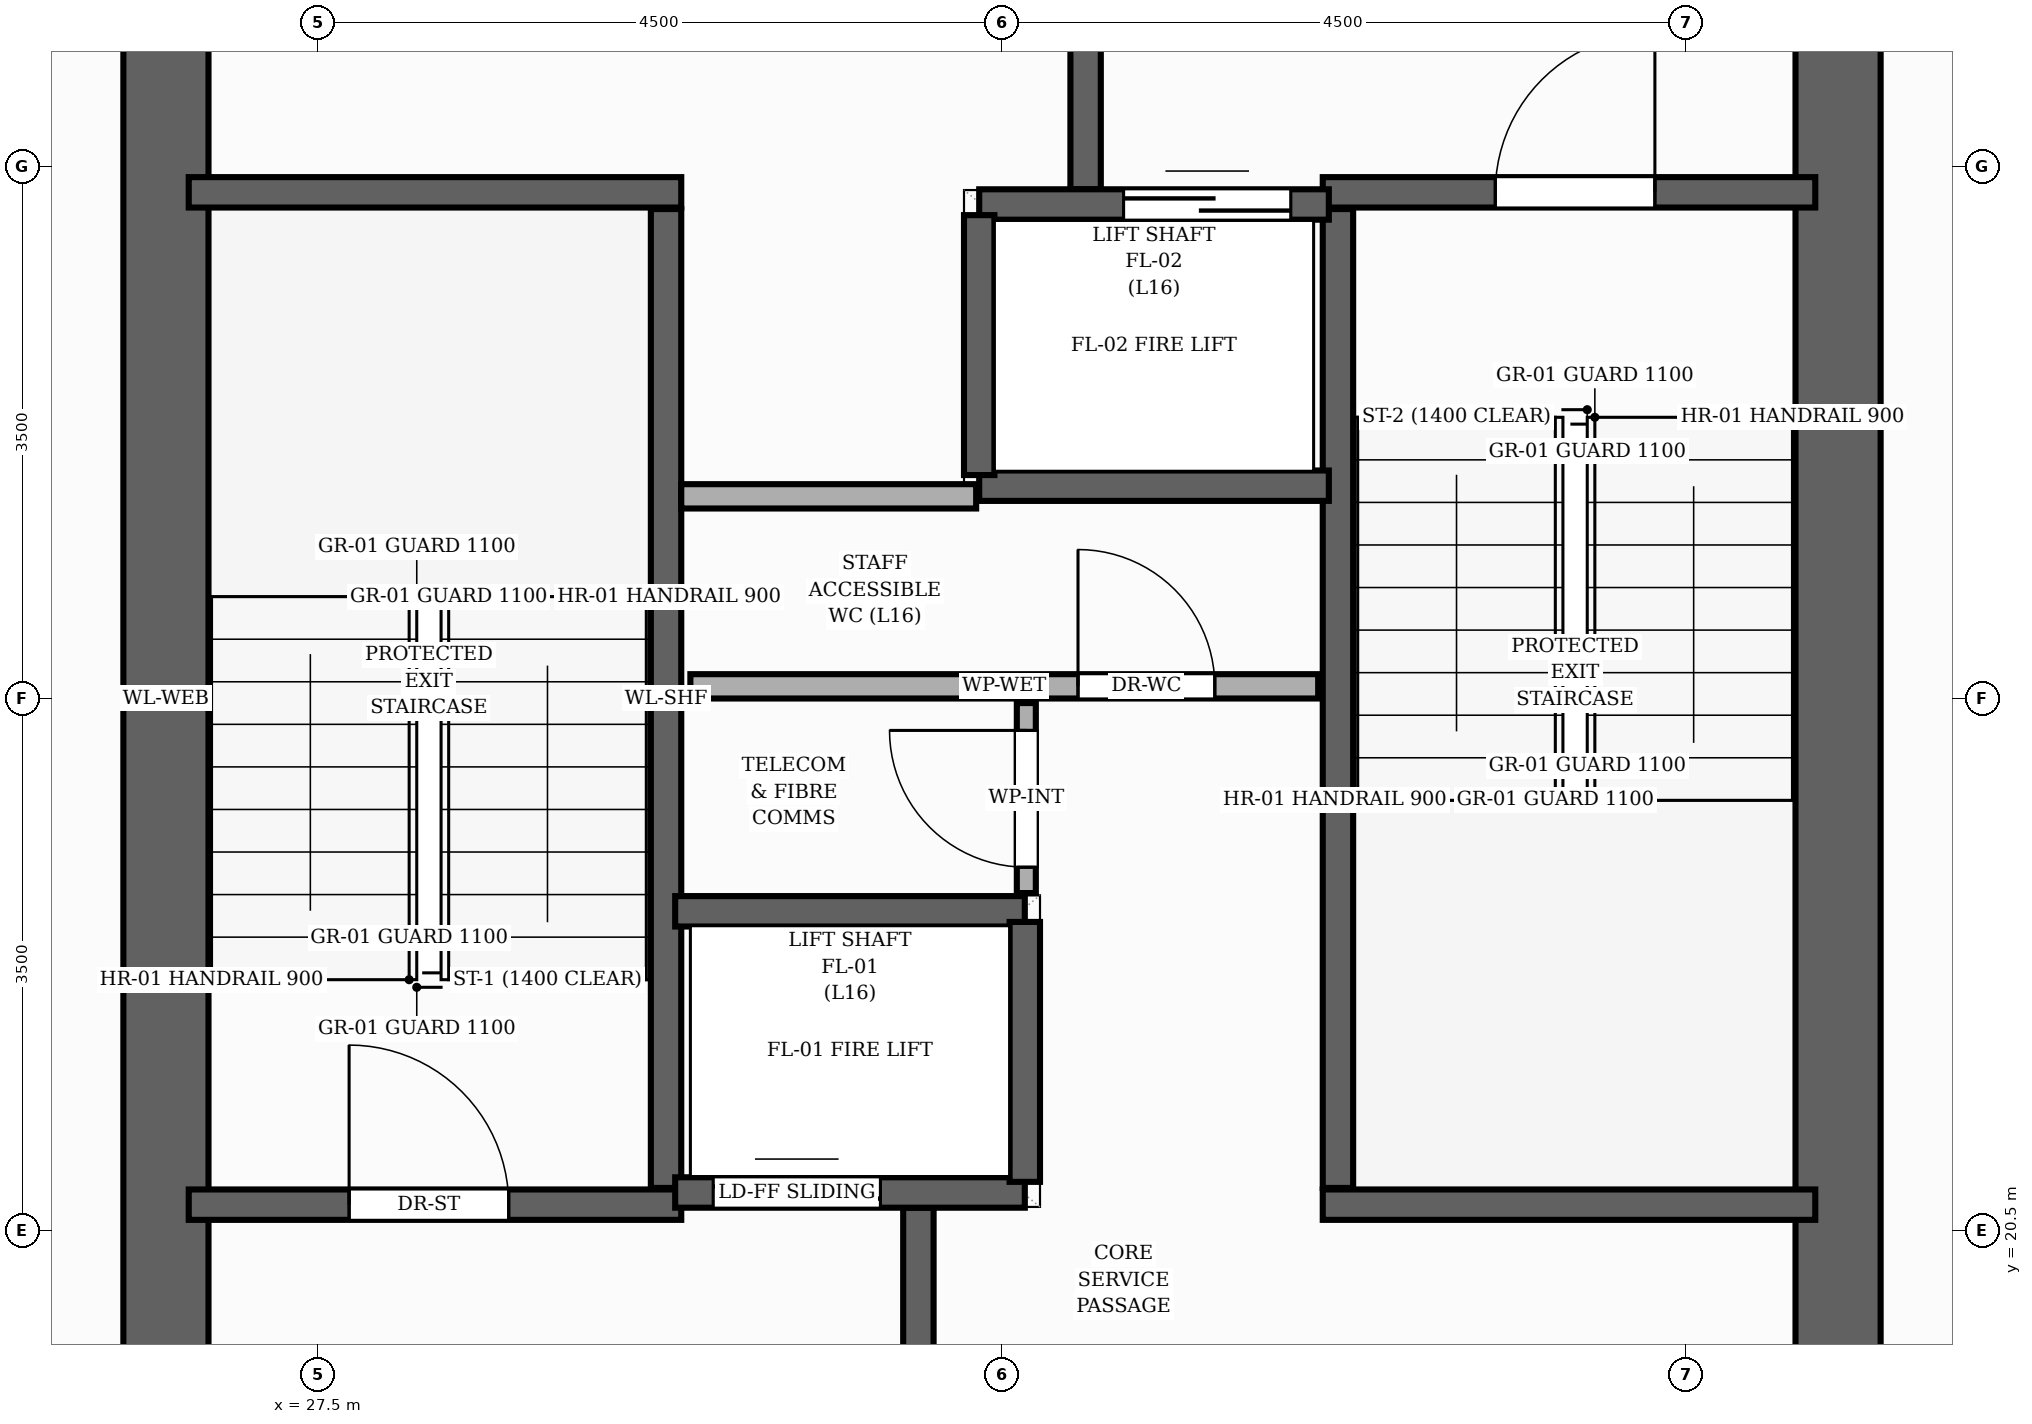
"""IFC4 building model, lengths in metres.
Left out: names, types, materials, properties, quantities, classifications, styles, units other than length and angle.
Written with IfcOpenShell. Run it as: python <this file> out.ifc"""

import sys

from ifc_helpers import new_model, si_unit, direction, frame, frame_2d, origin, place, context, subcontext, project, spatial, rectangle, extrude, element, fill, save


model = new_model("IFC4")
c1 = context("Model", 3, precision=1e-05, world=origin(), true_north=direction((0.0, 1.0)))
c2 = subcontext(c1, "Body", "Model", "MODEL_VIEW")
j1 = project(units=[si_unit("LENGTHUNIT", "METRE"), si_unit("PLANEANGLEUNIT", "RADIAN")], contexts=[c1])
p1 = place(None, origin())
s1 = spatial("IfcSite", under=j1, at=p1, CompositionType="ELEMENT")
p2 = place(p1, origin())
s2 = spatial("IfcBuilding", under=s1, at=p2, CompositionType="ELEMENT")
p3 = place(p2, frame((0.0, 0.0, 56.8)))
s3 = spatial("IfcBuildingStorey", under=s2, at=p3, CompositionType="ELEMENT", Elevation=56.8)
for number, where, z_axis, x_axis in (
    (1, (26.5, 17.4, 0.0), (0.0, 0.0, 1.0), (0.0, 1.0, 0.0)),
    (2, (37.5, 17.4, 0.0), (0.0, 0.0, 1.0), (0.0, 1.0, 0.0)),
):
    element("IfcWall", number, at=place(p3, frame(where, z_axis=z_axis, x_axis=x_axis)), inside=s3, PredefinedType="SHEAR", context=c2, shape_type="SweptSolid", body=[
        extrude(rectangle(XDim=13.2, YDim=0.56, at=frame_2d((6.6, 0.0))), origin(), (0.0, 0.0, 1.0), 3.2),
    ])
p4 = place(p3, frame((29.79, 20.78, 0.0), z_axis=(0.0, 0.0, 1.0), x_axis=(0.0, 1.0, 0.0)))
e3 = element("IfcWall", 3, at=p4, inside=s3, PredefinedType="SHEAR", context=c2, shape_type="SweptSolid", body=[
    extrude(rectangle(XDim=6.44, YDim=0.2, at=frame_2d((3.22, 0.0))), origin(), (0.0, 0.0, 1.0), 3.2),
])
p5 = place(p3, frame((26.65, 27.33, 0.0), z_axis=(0.0, 0.0, 1.0), x_axis=(1.0, 0.0, 0.0)))
e4 = element("IfcWall", 4, at=p5, inside=s3, PredefinedType="SHEAR", context=c2, shape_type="SweptSolid", body=[
    extrude(rectangle(XDim=3.24, YDim=0.2, at=frame_2d((1.62, 0.0))), origin(), (0.0, 0.0, 1.0), 3.2),
])
p6 = place(p3, frame((26.65, 20.67, 0.0), z_axis=(0.0, 0.0, 1.0), x_axis=(1.0, 0.0, 0.0)))
e5 = element("IfcWall", 5, at=p6, inside=s3, PredefinedType="SHEAR", context=c2, shape_type="SweptSolid", body=[
    extrude(rectangle(XDim=3.24, YDim=0.2, at=frame_2d((1.62, 0.0))), origin(), (0.0, 0.0, 1.0), 3.2),
])
p7 = place(p6, frame((1.055, 0.0, 0.0)))
e6 = element("IfcOpeningElement", 6, at=p7, cuts=e5, PredefinedType="OPENING", context=c2, shape_type="SweptSolid", body=[
    extrude(rectangle(XDim=1.05, YDim=2.15, at=frame_2d((0.525, 1.075))), frame((0.0, 0.11, 0.0), z_axis=(0.0, -1.0, 0.0), x_axis=(1.0, 0.0, 0.0)), (0.0, 0.0, 1.0), 0.22),
])
p8 = place(p3, frame((34.21, 20.78, 0.0), z_axis=(0.0, 0.0, 1.0), x_axis=(0.0, 1.0, 0.0)))
e7 = element("IfcWall", 7, at=p8, inside=s3, PredefinedType="SHEAR", context=c2, shape_type="SweptSolid", body=[
    extrude(rectangle(XDim=6.44, YDim=0.2, at=frame_2d((3.22, 0.0))), origin(), (0.0, 0.0, 1.0), 3.2),
])
p9 = place(p3, frame((34.11, 20.67, 0.0), z_axis=(0.0, 0.0, 1.0), x_axis=(1.0, 0.0, 0.0)))
e8 = element("IfcWall", 8, at=p9, inside=s3, PredefinedType="SHEAR", context=c2, shape_type="SweptSolid", body=[
    extrude(rectangle(XDim=3.24, YDim=0.2, at=frame_2d((1.62, 0.0))), origin(), (0.0, 0.0, 1.0), 3.2),
])
p10 = place(p3, frame((34.11, 27.33, 0.0), z_axis=(0.0, 0.0, 1.0), x_axis=(1.0, 0.0, 0.0)))
e9 = element("IfcWall", 9, at=p10, inside=s3, PredefinedType="SHEAR", context=c2, shape_type="SweptSolid", body=[
    extrude(rectangle(XDim=3.24, YDim=0.2, at=frame_2d((1.62, 0.0))), origin(), (0.0, 0.0, 1.0), 3.2),
])
p11 = place(p10, frame((1.135, 0.0, 0.0)))
e10 = element("IfcOpeningElement", 10, at=p11, cuts=e9, PredefinedType="OPENING", context=c2, shape_type="SweptSolid", body=[
    extrude(rectangle(XDim=1.05, YDim=2.15, at=frame_2d((0.525, 1.075))), frame((0.0, 0.11, 0.0), z_axis=(0.0, -1.0, 0.0), x_axis=(1.0, 0.0, 0.0)), (0.0, 0.0, 1.0), 0.22),
])
for number, where, z_axis, x_axis in (
    (11, (31.45, 17.15, 0.0), (0.0, 0.0, 1.0), (0.0, 1.0, 0.0)),
    (12, (32.55, 27.35, 0.0), (0.0, 0.0, 1.0), (0.0, 1.0, 0.0)),
):
    element("IfcWall", number, at=place(p3, frame(where, z_axis=z_axis, x_axis=x_axis)), inside=s3, PredefinedType="SHEAR", context=c2, shape_type="SweptSolid", body=[
        extrude(rectangle(XDim=3.5, YDim=0.2, at=frame_2d((1.75, 0.0))), origin(), (0.0, 0.0, 1.0), 3.2),
    ])
p12 = place(p3, frame((29.85, 20.75, 0.0), z_axis=(0.0, 0.0, 1.0), x_axis=(1.0, 0.0, 0.0)))
e13 = element("IfcWall", 13, at=p12, inside=s3, PredefinedType="SHEAR", context=c2, shape_type="SweptSolid", body=[
    extrude(rectangle(XDim=2.3, YDim=0.2, at=frame_2d((1.15, 0.0))), origin(), (0.0, 0.0, 1.0), 3.2),
])
p13 = place(p12, frame((0.25, 0.0, 0.0)))
e14 = element("IfcOpeningElement", 14, at=p13, cuts=e13, PredefinedType="OPENING", context=c2, shape_type="SweptSolid", body=[
    extrude(rectangle(XDim=1.1, YDim=2.15, at=frame_2d((0.55, 1.075))), frame((0.0, 0.11, 0.0), z_axis=(0.0, -1.0, 0.0), x_axis=(1.0, 0.0, 0.0)), (0.0, 0.0, 1.0), 0.22),
])
p14 = place(p3, frame((29.85, 22.6, 0.0), z_axis=(0.0, 0.0, 1.0), x_axis=(1.0, 0.0, 0.0)))
e15 = element("IfcWall", 15, at=p14, inside=s3, PredefinedType="SHEAR", context=c2, shape_type="SweptSolid", body=[
    extrude(rectangle(XDim=2.3, YDim=0.2, at=frame_2d((1.15, 0.0))), origin(), (0.0, 0.0, 1.0), 3.2),
])
p15 = place(p3, frame((32.15, 20.82, 0.0), z_axis=(0.0, 0.0, 1.0), x_axis=(0.0, 1.0, 0.0)))
e16 = element("IfcWall", 16, at=p15, inside=s3, PredefinedType="SHEAR", context=c2, shape_type="SweptSolid", body=[
    extrude(rectangle(XDim=1.71, YDim=0.2, at=frame_2d((0.855, 0.0))), origin(), (0.0, 0.0, 1.0), 3.2),
])
p16 = place(p3, frame((31.85, 27.25, 0.0), z_axis=(0.0, 0.0, 1.0), x_axis=(1.0, 0.0, 0.0)))
e17 = element("IfcWall", 17, at=p16, inside=s3, PredefinedType="SHEAR", context=c2, shape_type="SweptSolid", body=[
    extrude(rectangle(XDim=2.3, YDim=0.2, at=frame_2d((1.15, 0.0))), origin(), (0.0, 0.0, 1.0), 3.2),
])
p17 = place(p16, frame((0.95, 0.0, 0.0)))
e18 = element("IfcOpeningElement", 18, at=p17, cuts=e17, PredefinedType="OPENING", context=c2, shape_type="SweptSolid", body=[
    extrude(rectangle(XDim=1.1, YDim=2.15, at=frame_2d((0.55, 1.075))), frame((0.0, 0.11, 0.0), z_axis=(0.0, -1.0, 0.0), x_axis=(1.0, 0.0, 0.0)), (0.0, 0.0, 1.0), 0.22),
])
p18 = place(p3, frame((31.85, 25.4, 0.0), z_axis=(0.0, 0.0, 1.0), x_axis=(1.0, 0.0, 0.0)))
e19 = element("IfcWall", 19, at=p18, inside=s3, PredefinedType="SHEAR", context=c2, shape_type="SweptSolid", body=[
    extrude(rectangle(XDim=2.3, YDim=0.2, at=frame_2d((1.15, 0.0))), origin(), (0.0, 0.0, 1.0), 3.2),
])
p19 = place(p3, frame((31.85, 25.47, 0.0), z_axis=(0.0, 0.0, 1.0), x_axis=(0.0, 1.0, 0.0)))
e20 = element("IfcWall", 20, at=p19, inside=s3, PredefinedType="SHEAR", context=c2, shape_type="SweptSolid", body=[
    extrude(rectangle(XDim=1.71, YDim=0.2, at=frame_2d((0.855, 0.0))), origin(), (0.0, 0.0, 1.0), 3.2),
])
p20 = place(p3, frame((29.95, 24.08, 0.0), z_axis=(0.0, 0.0, 1.0), x_axis=(1.0, 0.0, 0.0)))
e21 = element("IfcWall", 21, at=p20, inside=s3, PredefinedType="PLUMBINGWALL", context=c2, shape_type="SweptSolid", body=[
    extrude(rectangle(XDim=4.13, YDim=0.16, at=frame_2d((2.065, 0.0))), origin(), (0.0, 0.0, 1.0), 2.955),
])
p21 = place(p20, frame((2.55, 0.0, 0.0)))
e22 = element("IfcOpeningElement", 22, at=p21, cuts=e21, PredefinedType="OPENING", context=c2, shape_type="SweptSolid", body=[
    extrude(rectangle(XDim=0.9, YDim=2.1, at=frame_2d((0.45, 1.05))), frame((0.0, 0.09, 0.0), z_axis=(0.0, -1.0, 0.0), x_axis=(1.0, 0.0, 0.0)), (0.0, 0.0, 1.0), 0.18),
])
p22 = place(p3, frame((32.16, 22.72, 0.0), z_axis=(0.0, 0.0, 1.0), x_axis=(0.0, 1.0, 0.0)))
e23 = element("IfcWall", 23, at=p22, inside=s3, PredefinedType="PARTITIONING", context=c2, shape_type="SweptSolid", body=[
    extrude(rectangle(XDim=1.25, YDim=0.125, at=frame_2d((0.625, 0.0))), origin(), (0.0, 0.0, 1.0), 2.955),
])
p23 = place(p22, frame((0.17, 0.0, 0.0)))
e24 = element("IfcOpeningElement", 24, at=p23, cuts=e23, PredefinedType="OPENING", context=c2, shape_type="SweptSolid", body=[
    extrude(rectangle(XDim=0.9, YDim=2.1, at=frame_2d((0.45, 1.05))), frame((0.0, 0.073, 0.0), z_axis=(0.0, -1.0, 0.0), x_axis=(1.0, 0.0, 0.0)), (0.0, 0.0, 1.0), 0.145),
])
p24 = place(p3, frame((29.89, 25.33, 0.0), z_axis=(0.0, 0.0, 1.0), x_axis=(1.0, 0.0, 0.0)))
e25 = element("IfcWall", 25, at=p24, inside=s3, PredefinedType="PLUMBINGWALL", context=c2, shape_type="SweptSolid", body=[
    extrude(rectangle(XDim=1.94, YDim=0.16, at=frame_2d((0.97, 0.0))), origin(), (0.0, 0.0, 1.0), 2.955),
])
p25 = place(p7, origin())
e26 = element("IfcDoor", 26, at=p25, inside=s3, OperationType="SINGLE_SWING_LEFT", PredefinedType="DOOR", context=c2, shape_type="SweptSolid", body=[
    extrude(rectangle(XDim=1.05, YDim=2.15, at=frame_2d((0.525, 1.075))), frame((0.0, 0.025, 0.0), z_axis=(0.0, -1.0, 0.0), x_axis=(1.0, 0.0, 0.0)), (0.0, 0.0, 1.0), 0.05),
])
fill(e6, e26)
p26 = place(p11, origin())
e27 = element("IfcDoor", 27, at=p26, inside=s3, OperationType="SINGLE_SWING_RIGHT", PredefinedType="DOOR", context=c2, shape_type="SweptSolid", body=[
    extrude(rectangle(XDim=1.05, YDim=2.15, at=frame_2d((0.525, 1.075))), frame((0.0, 0.025, 0.0), z_axis=(0.0, -1.0, 0.0), x_axis=(1.0, 0.0, 0.0)), (0.0, 0.0, 1.0), 0.05),
])
fill(e10, e27)
p27 = place(p13, origin())
e28 = element("IfcDoor", 28, at=p27, inside=s3, OperationType="DOUBLE_DOOR_SLIDING", PredefinedType="DOOR", context=c2, shape_type="SweptSolid", body=[
    extrude(rectangle(XDim=1.1, YDim=2.15, at=frame_2d((0.55, 1.075))), frame((0.0, 0.025, 0.0), z_axis=(0.0, -1.0, 0.0), x_axis=(1.0, 0.0, 0.0)), (0.0, 0.0, 1.0), 0.05),
])
fill(e14, e28)
p28 = place(p17, origin())
e29 = element("IfcDoor", 29, at=p28, inside=s3, OperationType="DOUBLE_DOOR_SLIDING", PredefinedType="DOOR", context=c2, shape_type="SweptSolid", body=[
    extrude(rectangle(XDim=1.1, YDim=2.15, at=frame_2d((0.55, 1.075))), frame((0.0, 0.025, 0.0), z_axis=(0.0, -1.0, 0.0), x_axis=(1.0, 0.0, 0.0)), (0.0, 0.0, 1.0), 0.05),
])
fill(e18, e29)
p29 = place(p21, origin())
e30 = element("IfcDoor", 30, at=p29, inside=s3, OperationType="SINGLE_SWING_LEFT", PredefinedType="DOOR", context=c2, shape_type="SweptSolid", body=[
    extrude(rectangle(XDim=0.9, YDim=2.1, at=frame_2d((0.45, 1.05))), frame((0.0, 0.025, 0.0), z_axis=(0.0, -1.0, 0.0), x_axis=(1.0, 0.0, 0.0)), (0.0, 0.0, 1.0), 0.05),
])
fill(e22, e30)
p30 = place(p23, origin())
e31 = element("IfcDoor", 31, at=p30, inside=s3, OperationType="SINGLE_SWING_RIGHT", PredefinedType="DOOR", context=c2, shape_type="SweptSolid", body=[
    extrude(rectangle(XDim=0.9, YDim=2.1, at=frame_2d((0.45, 1.05))), frame((0.0, 0.025, 0.0), z_axis=(0.0, -1.0, 0.0), x_axis=(1.0, 0.0, 0.0)), (0.0, 0.0, 1.0), 0.05),
])
fill(e24, e31)
save(model, sys.argv[1])
